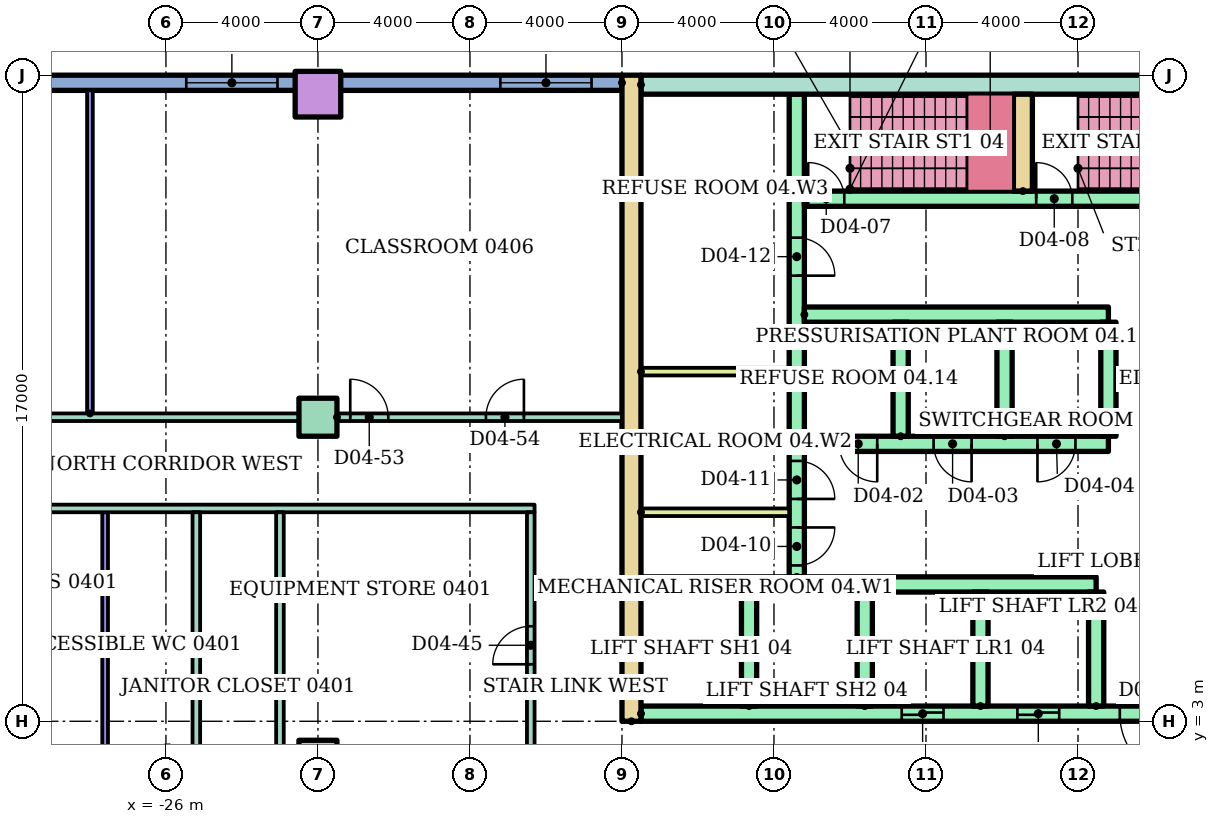
"""IFC4 building model, lengths in metres.
Left out: names, types, materials, properties, quantities, classifications, styles, units other than length and angle.
Written with IfcOpenShell. Run it as: python <this file> out.ifc"""

import sys

from ifc_helpers import new_model, si_unit, direction, frame, frame_2d, origin, origin_2d, place, context, subcontext, project, spatial, rectangle, hollow_rectangle, extrude, element, fill, save


model = new_model("IFC4")
c1 = context("Model", 3, precision=1e-05, world=origin(), true_north=direction((0.0, 1.0)))
c2 = subcontext(c1, "Body", "Model", "MODEL_VIEW")
j1 = project(units=[si_unit("LENGTHUNIT", "METRE"), si_unit("PLANEANGLEUNIT", "RADIAN")], contexts=[c1])
p1 = place(None, origin())
s1 = spatial("IfcSite", under=j1, at=p1, CompositionType="ELEMENT")
p2 = place(p1, origin())
s2 = spatial("IfcBuilding", under=s1, at=p2, CompositionType="ELEMENT")
p3 = place(p2, frame((0.0, 0.0, 18.0)))
s3 = spatial("IfcBuildingStorey", under=s2, at=p3, CompositionType="ELEMENT", Elevation=18.0)
for number, where in (
    (1, (-22.0, 2.0, 0.0)),
    (2, (-22.0, 11.0, 0.0)),
):
    element("IfcColumn", number, at=place(p3, frame(where)), inside=s3, PredefinedType="COLUMN", context=c2, shape_type="SweptSolid", body=[
        extrude(rectangle(XDim=1.0, YDim=1.0, at=origin_2d()), origin(), (0.0, 0.0, 1.0), 4.0),
    ])
p4 = place(p3, frame((-22.0, 19.5, 0.0)))
e3 = element("IfcColumn", 3, at=p4, inside=s3, PredefinedType="COLUMN", context=c2, shape_type="SweptSolid", body=[
    extrude(hollow_rectangle(XDim=1.2, YDim=1.2, WallThickness=0.06, at=origin_2d()), origin(), (0.0, 0.0, 1.0), 4.0),
])
p5 = place(p3, frame((-14.0, 19.8, 0.0), z_axis=(0.0, 0.0, 1.0), x_axis=(-1.0, 0.0, 0.0)))
e4 = element("IfcWall", 4, at=p5, inside=s3, PredefinedType="STANDARD", context=c2, shape_type="SweptSolid", body=[
    extrude(rectangle(XDim=25.6, YDim=0.4, at=frame_2d((12.8, 0.0))), origin(), (0.0, 0.0, 1.0), 3.7),
])
p6 = place(p5, frame((0.8, 0.0, 0.9)))
e5 = element("IfcOpeningElement", 5, at=p6, cuts=e4, PredefinedType="OPENING", context=c2, shape_type="SweptSolid", body=[
    extrude(rectangle(XDim=2.4, YDim=2.1, at=frame_2d((1.2, 1.05))), frame((0.0, 0.21, 0.0), z_axis=(0.0, -1.0, 0.0), x_axis=(1.0, 0.0, 0.0)), (0.0, 0.0, 1.0), 0.42),
])
p7 = place(p5, frame((9.065, 0.0, 0.9)))
e6 = element("IfcOpeningElement", 6, at=p7, cuts=e4, PredefinedType="OPENING", context=c2, shape_type="SweptSolid", body=[
    extrude(rectangle(XDim=2.4, YDim=2.1, at=frame_2d((1.2, 1.05))), frame((0.0, 0.21, 0.0), z_axis=(0.0, -1.0, 0.0), x_axis=(1.0, 0.0, 0.0)), (0.0, 0.0, 1.0), 0.42),
])
p8 = place(p5, frame((20.8, 0.0, 0.9)))
e7 = element("IfcOpeningElement", 7, at=p8, cuts=e4, PredefinedType="OPENING", context=c2, shape_type="SweptSolid", body=[
    extrude(rectangle(XDim=2.4, YDim=2.1, at=frame_2d((1.2, 1.05))), frame((0.0, 0.21, 0.0), z_axis=(0.0, -1.0, 0.0), x_axis=(1.0, 0.0, 0.0)), (0.0, 0.0, 1.0), 0.42),
])
p9 = place(p3, frame((-13.75, 3.0, 0.0), z_axis=(0.0, 0.0, 1.0), x_axis=(0.0, 1.0, 0.0)))
e8 = element("IfcWall", 8, at=p9, inside=s3, PredefinedType="SHEAR", context=c2, shape_type="SweptSolid", body=[
    extrude(rectangle(XDim=17.0, YDim=0.5, at=frame_2d((8.5, 0.0))), origin(), (0.0, 0.0, 1.0), 3.7),
])
p10 = place(p3, frame((-13.5, 19.75, 0.0)))
e9 = element("IfcWall", 9, at=p10, inside=s3, PredefinedType="SHEAR", context=c2, shape_type="SweptSolid", body=[
    extrude(rectangle(XDim=27.0, YDim=0.5, at=frame_2d((13.5, 0.0))), origin(), (0.0, 0.0, 1.0), 3.7),
])
p11 = place(p3, frame((-9.4, 6.8, 0.0), z_axis=(0.0, 0.0, 1.0), x_axis=(0.0, 1.0, 0.0)))
e10 = element("IfcWall", 10, at=p11, inside=s3, PredefinedType="SHEAR", context=c2, shape_type="SweptSolid", body=[
    extrude(rectangle(XDim=12.7, YDim=0.4, at=frame_2d((6.35, 0.0))), origin(), (0.0, 0.0, 1.0), 3.7),
])
p12 = place(p11, frame((0.3, 0.0, 0.0)))
e11 = element("IfcOpeningElement", 11, at=p12, cuts=e10, PredefinedType="OPENING", context=c2, shape_type="SweptSolid", body=[
    extrude(rectangle(XDim=1.0, YDim=2.1, at=frame_2d((0.5, 1.05))), frame((0.0, 0.21, 0.0), z_axis=(0.0, -1.0, 0.0), x_axis=(1.0, 0.0, 0.0)), (0.0, 0.0, 1.0), 0.42),
])
p13 = place(p11, frame((2.05, 0.0, 0.0)))
e12 = element("IfcOpeningElement", 12, at=p13, cuts=e10, PredefinedType="OPENING", context=c2, shape_type="SweptSolid", body=[
    extrude(rectangle(XDim=1.0, YDim=2.1, at=frame_2d((0.5, 1.05))), frame((0.0, 0.21, 0.0), z_axis=(0.0, -1.0, 0.0), x_axis=(1.0, 0.0, 0.0)), (0.0, 0.0, 1.0), 0.42),
])
p14 = place(p11, frame((7.925, 0.0, 0.0)))
e13 = element("IfcOpeningElement", 13, at=p14, cuts=e10, PredefinedType="OPENING", context=c2, shape_type="SweptSolid", body=[
    extrude(rectangle(XDim=1.0, YDim=2.1, at=frame_2d((0.5, 1.05))), frame((0.0, 0.21, 0.0), z_axis=(0.0, -1.0, 0.0), x_axis=(1.0, 0.0, 0.0)), (0.0, 0.0, 1.0), 0.42),
])
p15 = place(p3, frame((-13.5, 3.2, 0.0)))
e14 = element("IfcWall", 14, at=p15, inside=s3, PredefinedType="SHEAR", context=c2, shape_type="SweptSolid", body=[
    extrude(rectangle(XDim=27.0, YDim=0.4, at=frame_2d((13.5, 0.0))), origin(), (0.0, 0.0, 1.0), 3.7),
])
p16 = place(p15, frame((6.861, 0.0, 0.0)))
e15 = element("IfcOpeningElement", 15, at=p16, cuts=e14, PredefinedType="OPENING", context=c2, shape_type="SweptSolid", body=[
    extrude(rectangle(XDim=1.1, YDim=2.1, at=frame_2d((0.55, 1.05))), frame((0.0, 0.21, 0.0), z_axis=(0.0, -1.0, 0.0), x_axis=(1.0, 0.0, 0.0)), (0.0, 0.0, 1.0), 0.42),
])
p17 = place(p15, frame((9.906, 0.0, 0.0)))
e16 = element("IfcOpeningElement", 16, at=p17, cuts=e14, PredefinedType="OPENING", context=c2, shape_type="SweptSolid", body=[
    extrude(rectangle(XDim=1.1, YDim=2.1, at=frame_2d((0.55, 1.05))), frame((0.0, 0.21, 0.0), z_axis=(0.0, -1.0, 0.0), x_axis=(1.0, 0.0, 0.0)), (0.0, 0.0, 1.0), 0.42),
])
p18 = place(p15, frame((15.994, 0.0, 0.0)))
e17 = element("IfcOpeningElement", 17, at=p18, cuts=e14, PredefinedType="OPENING", context=c2, shape_type="SweptSolid", body=[
    extrude(rectangle(XDim=1.1, YDim=2.1, at=frame_2d((0.55, 1.05))), frame((0.0, 0.21, 0.0), z_axis=(0.0, -1.0, 0.0), x_axis=(1.0, 0.0, 0.0)), (0.0, 0.0, 1.0), 0.42),
])
p19 = place(p15, frame((19.039, 0.0, 0.0)))
e18 = element("IfcOpeningElement", 18, at=p19, cuts=e14, PredefinedType="OPENING", context=c2, shape_type="SweptSolid", body=[
    extrude(rectangle(XDim=1.1, YDim=2.1, at=frame_2d((0.55, 1.05))), frame((0.0, 0.21, 0.0), z_axis=(0.0, -1.0, 0.0), x_axis=(1.0, 0.0, 0.0)), (0.0, 0.0, 1.0), 0.42),
])
p20 = place(p15, frame((12.6, 0.0, 0.0)))
e19 = element("IfcOpeningElement", 19, at=p20, cuts=e14, PredefinedType="OPENING", context=c2, shape_type="SweptSolid", body=[
    extrude(rectangle(XDim=1.8, YDim=2.1, at=frame_2d((0.9, 1.05))), frame((0.0, 0.21, 0.0), z_axis=(0.0, -1.0, 0.0), x_axis=(1.0, 0.0, 0.0)), (0.0, 0.0, 1.0), 0.42),
])
p21 = place(p3, frame((-13.5, 6.6, 0.0)))
e20 = element("IfcWall", 20, at=p21, inside=s3, PredefinedType="SHEAR", context=c2, shape_type="SweptSolid", body=[
    extrude(rectangle(XDim=11.978, YDim=0.4, at=frame_2d((5.989, 0.0))), origin(), (0.0, 0.0, 1.0), 3.7),
])
for number, where, z_axis, x_axis in (
    (21, (-10.656, 3.4, 0.0), (0.0, 0.0, 1.0), (0.0, 1.0, 0.0)),
    (22, (-7.611, 3.4, 0.0), (0.0, 0.0, 1.0), (0.0, 1.0, 0.0)),
    (23, (-4.567, 3.4, 0.0), (0.0, 0.0, 1.0), (0.0, 1.0, 0.0)),
    (24, (-1.522, 3.4, 0.0), (0.0, 0.0, 1.0), (0.0, 1.0, 0.0)),
):
    element("IfcWall", number, at=place(p3, frame(where, z_axis=z_axis, x_axis=x_axis)), inside=s3, PredefinedType="SHEAR", context=c2, shape_type="SweptSolid", body=[
        extrude(rectangle(XDim=3.0, YDim=0.4, at=frame_2d((1.5, 0.0))), origin(), (0.0, 0.0, 1.0), 3.7),
    ])
p22 = place(p3, frame((-9.2, 10.3, 0.0)))
e25 = element("IfcWall", 25, at=p22, inside=s3, PredefinedType="SHEAR", context=c2, shape_type="SweptSolid", body=[
    extrude(rectangle(XDim=8.0, YDim=0.4, at=frame_2d((4.0, 0.0))), origin(), (0.0, 0.0, 1.0), 3.7),
])
p23 = place(p22, frame((0.917, 0.0, 0.0)))
e26 = element("IfcOpeningElement", 26, at=p23, cuts=e25, PredefinedType="OPENING", context=c2, shape_type="SweptSolid", body=[
    extrude(rectangle(XDim=1.0, YDim=2.1, at=frame_2d((0.5, 1.05))), frame((0.0, 0.21, 0.0), z_axis=(0.0, -1.0, 0.0), x_axis=(1.0, 0.0, 0.0)), (0.0, 0.0, 1.0), 0.42),
])
p24 = place(p22, frame((3.4, 0.0, 0.0)))
e27 = element("IfcOpeningElement", 27, at=p24, cuts=e25, PredefinedType="OPENING", context=c2, shape_type="SweptSolid", body=[
    extrude(rectangle(XDim=1.0, YDim=2.1, at=frame_2d((0.5, 1.05))), frame((0.0, 0.21, 0.0), z_axis=(0.0, -1.0, 0.0), x_axis=(1.0, 0.0, 0.0)), (0.0, 0.0, 1.0), 0.42),
])
p25 = place(p22, frame((6.133, 0.0, 0.0)))
e28 = element("IfcOpeningElement", 28, at=p25, cuts=e25, PredefinedType="OPENING", context=c2, shape_type="SweptSolid", body=[
    extrude(rectangle(XDim=1.0, YDim=2.1, at=frame_2d((0.5, 1.05))), frame((0.0, 0.21, 0.0), z_axis=(0.0, -1.0, 0.0), x_axis=(1.0, 0.0, 0.0)), (0.0, 0.0, 1.0), 0.42),
])
p26 = place(p3, frame((-9.2, 13.7, 0.0)))
e29 = element("IfcWall", 29, at=p26, inside=s3, PredefinedType="SHEAR", context=c2, shape_type="SweptSolid", body=[
    extrude(rectangle(XDim=8.0, YDim=0.4, at=frame_2d((4.0, 0.0))), origin(), (0.0, 0.0, 1.0), 3.7),
])
for number, where, z_axis, x_axis in (
    (30, (-6.667, 10.5, 0.0), (0.0, 0.0, 1.0), (0.0, 1.0, 0.0)),
    (31, (-3.933, 10.5, 0.0), (0.0, 0.0, 1.0), (0.0, 1.0, 0.0)),
    (32, (-1.2, 10.5, 0.0), (0.0, 0.0, 1.0), (0.0, 1.0, 0.0)),
):
    element("IfcWall", number, at=place(p3, frame(where, z_axis=z_axis, x_axis=x_axis)), inside=s3, PredefinedType="SHEAR", context=c2, shape_type="SweptSolid", body=[
        extrude(rectangle(XDim=3.0, YDim=0.4, at=frame_2d((1.5, 0.0))), origin(), (0.0, 0.0, 1.0), 3.7),
    ])
p27 = place(p3, frame((-9.2, 16.75, 0.0)))
e33 = element("IfcWall", 33, at=p27, inside=s3, PredefinedType="SHEAR", context=c2, shape_type="SweptSolid", body=[
    extrude(rectangle(XDim=18.4, YDim=0.4, at=frame_2d((9.2, 0.0))), origin(), (0.0, 0.0, 1.0), 3.7),
])
p28 = place(p27, frame((0.1, 0.0, 0.0)))
e34 = element("IfcOpeningElement", 34, at=p28, cuts=e33, PredefinedType="OPENING", context=c2, shape_type="SweptSolid", body=[
    extrude(rectangle(XDim=0.95, YDim=2.1, at=frame_2d((0.475, 1.05))), frame((0.0, 0.21, 0.0), z_axis=(0.0, -1.0, 0.0), x_axis=(1.0, 0.0, 0.0)), (0.0, 0.0, 1.0), 0.42),
])
p29 = place(p27, frame((6.1, 0.0, 0.0)))
e35 = element("IfcOpeningElement", 35, at=p29, cuts=e33, PredefinedType="OPENING", context=c2, shape_type="SweptSolid", body=[
    extrude(rectangle(XDim=0.95, YDim=2.1, at=frame_2d((0.475, 1.05))), frame((0.0, 0.21, 0.0), z_axis=(0.0, -1.0, 0.0), x_axis=(1.0, 0.0, 0.0)), (0.0, 0.0, 1.0), 0.42),
])
p30 = place(p27, frame((12.1, 0.0, 0.0)))
e36 = element("IfcOpeningElement", 36, at=p30, cuts=e33, PredefinedType="OPENING", context=c2, shape_type="SweptSolid", body=[
    extrude(rectangle(XDim=0.95, YDim=2.1, at=frame_2d((0.475, 1.05))), frame((0.0, 0.21, 0.0), z_axis=(0.0, -1.0, 0.0), x_axis=(1.0, 0.0, 0.0)), (0.0, 0.0, 1.0), 0.42),
])
p31 = place(p3, frame((-3.45, 16.95, 0.0), z_axis=(0.0, 0.0, 1.0), x_axis=(0.0, 1.0, 0.0)))
e37 = element("IfcWall", 37, at=p31, inside=s3, PredefinedType="SHEAR", context=c2, shape_type="SweptSolid", body=[
    extrude(rectangle(XDim=2.55, YDim=0.5, at=frame_2d((1.275, 0.0))), origin(), (0.0, 0.0, 1.0), 3.7),
])
for number, where in (
    (38, (-13.5, 8.5, 0.0)),
    (39, (-13.5, 12.2, 0.0)),
):
    element("IfcWall", number, at=place(p3, frame(where)), inside=s3, PredefinedType="PARTITIONING", context=c2, shape_type="SweptSolid", body=[
        extrude(rectangle(XDim=3.9, YDim=0.2, at=frame_2d((1.95, 0.0))), origin(), (0.0, 0.0, 1.0), 3.7),
    ])
p32 = place(p3, frame((-37.6, 8.6, 0.0)))
e40 = element("IfcWall", 40, at=p32, inside=s3, PredefinedType="PARTITIONING", context=c2, shape_type="SweptSolid", body=[
    extrude(rectangle(XDim=21.3, YDim=0.2, at=frame_2d((10.65, 0.0))), origin(), (0.0, 0.0, 1.0), 3.7),
])
p33 = place(p3, frame((-29.5, 11.0, 0.0)))
e41 = element("IfcWall", 41, at=p33, inside=s3, PredefinedType="PARTITIONING", context=c2, shape_type="SweptSolid", body=[
    extrude(rectangle(XDim=7.0, YDim=0.2, at=frame_2d((3.5, 0.0))), origin(), (0.0, 0.0, 1.0), 3.7),
])
p34 = place(p3, frame((-21.5, 11.0, 0.0)))
e42 = element("IfcWall", 42, at=p34, inside=s3, PredefinedType="PARTITIONING", context=c2, shape_type="SweptSolid", body=[
    extrude(rectangle(XDim=7.5, YDim=0.2, at=frame_2d((3.75, 0.0))), origin(), (0.0, 0.0, 1.0), 3.7),
])
p35 = place(p34, frame((0.35, 0.0, 0.0)))
e43 = element("IfcOpeningElement", 43, at=p35, cuts=e42, PredefinedType="OPENING", context=c2, shape_type="SweptSolid", body=[
    extrude(rectangle(XDim=1.0, YDim=2.1, at=frame_2d((0.5, 1.05))), frame((0.0, 0.11, 0.0), z_axis=(0.0, -1.0, 0.0), x_axis=(1.0, 0.0, 0.0)), (0.0, 0.0, 1.0), 0.22),
])
p36 = place(p34, frame((3.92, 0.0, 0.0)))
e44 = element("IfcOpeningElement", 44, at=p36, cuts=e42, PredefinedType="OPENING", context=c2, shape_type="SweptSolid", body=[
    extrude(rectangle(XDim=1.0, YDim=2.1, at=frame_2d((0.5, 1.05))), frame((0.0, 0.11, 0.0), z_axis=(0.0, -1.0, 0.0), x_axis=(1.0, 0.0, 0.0)), (0.0, 0.0, 1.0), 0.22),
])
p37 = place(p3, frame((-28.0, 11.1, 0.0), z_axis=(0.0, 0.0, 1.0), x_axis=(0.0, 1.0, 0.0)))
e45 = element("IfcWall", 45, at=p37, inside=s3, PredefinedType="PARTITIONING", context=c2, shape_type="SweptSolid", body=[
    extrude(rectangle(XDim=8.5, YDim=0.15, at=frame_2d((4.25, 0.0))), origin(), (0.0, 0.0, 1.0), 3.7),
])
p38 = place(p3, frame((-27.6, 1.5, 0.0), z_axis=(0.0, 0.0, 1.0), x_axis=(0.0, 1.0, 0.0)))
e46 = element("IfcWall", 46, at=p38, inside=s3, PredefinedType="PARTITIONING", context=c2, shape_type="SweptSolid", body=[
    extrude(rectangle(XDim=7.0, YDim=0.15, at=frame_2d((3.5, 0.0))), origin(), (0.0, 0.0, 1.0), 3.7),
])
for number, where, z_axis, x_axis in (
    (47, (-25.2, 1.5, 0.0), (0.0, 0.0, 1.0), (0.0, 1.0, 0.0)),
    (48, (-23.0, 1.5, 0.0), (0.0, 0.0, 1.0), (0.0, 1.0, 0.0)),
):
    element("IfcWall", number, at=place(p3, frame(where, z_axis=z_axis, x_axis=x_axis)), inside=s3, PredefinedType="PARTITIONING", context=c2, shape_type="SweptSolid", body=[
        extrude(rectangle(XDim=7.0, YDim=0.2, at=frame_2d((3.5, 0.0))), origin(), (0.0, 0.0, 1.0), 3.7),
    ])
p39 = place(p3, frame((-16.4, 1.5, 0.0), z_axis=(0.0, 0.0, 1.0), x_axis=(0.0, 1.0, 0.0)))
e49 = element("IfcWall", 49, at=p39, inside=s3, PredefinedType="PARTITIONING", context=c2, shape_type="SweptSolid", body=[
    extrude(rectangle(XDim=7.0, YDim=0.2, at=frame_2d((3.5, 0.0))), origin(), (0.0, 0.0, 1.0), 3.7),
])
p40 = place(p39, frame((3.0, 0.0, 0.0)))
e50 = element("IfcOpeningElement", 50, at=p40, cuts=e49, PredefinedType="OPENING", context=c2, shape_type="SweptSolid", body=[
    extrude(rectangle(XDim=1.0, YDim=2.1, at=frame_2d((0.5, 1.05))), frame((0.0, 0.11, 0.0), z_axis=(0.0, -1.0, 0.0), x_axis=(1.0, 0.0, 0.0)), (0.0, 0.0, 1.0), 0.22),
])
p41 = place(p6, origin())
e51 = element("IfcWindow", 51, at=p41, inside=s3, PartitioningType="SINGLE_PANEL", PredefinedType="WINDOW", context=c2, shape_type="SweptSolid", body=[
    extrude(rectangle(XDim=2.4, YDim=2.1, at=frame_2d((1.2, 1.05))), frame((0.0, 0.03, 0.0), z_axis=(0.0, -1.0, 0.0), x_axis=(1.0, 0.0, 0.0)), (0.0, 0.0, 1.0), 0.06),
])
fill(e5, e51)
p42 = place(p7, origin())
e52 = element("IfcWindow", 52, at=p42, inside=s3, PartitioningType="SINGLE_PANEL", PredefinedType="WINDOW", context=c2, shape_type="SweptSolid", body=[
    extrude(rectangle(XDim=2.4, YDim=2.1, at=frame_2d((1.2, 1.05))), frame((0.0, 0.03, 0.0), z_axis=(0.0, -1.0, 0.0), x_axis=(1.0, 0.0, 0.0)), (0.0, 0.0, 1.0), 0.06),
])
fill(e6, e52)
p43 = place(p16, origin())
e53 = element("IfcDoor", 53, at=p43, inside=s3, OperationType="SLIDING_TO_LEFT", PredefinedType="DOOR", context=c2, shape_type="SweptSolid", body=[
    extrude(rectangle(XDim=1.1, YDim=2.1, at=frame_2d((0.55, 1.05))), frame((0.0, 0.025, 0.0), z_axis=(0.0, -1.0, 0.0), x_axis=(1.0, 0.0, 0.0)), (0.0, 0.0, 1.0), 0.05),
])
fill(e15, e53)
p44 = place(p17, origin())
e54 = element("IfcDoor", 54, at=p44, inside=s3, OperationType="SLIDING_TO_LEFT", PredefinedType="DOOR", context=c2, shape_type="SweptSolid", body=[
    extrude(rectangle(XDim=1.1, YDim=2.1, at=frame_2d((0.55, 1.05))), frame((0.0, 0.025, 0.0), z_axis=(0.0, -1.0, 0.0), x_axis=(1.0, 0.0, 0.0)), (0.0, 0.0, 1.0), 0.05),
])
fill(e16, e54)
p45 = place(p20, frame((1.8, 0.0, 0.0), z_axis=(0.0, 0.0, 1.0), x_axis=(-1.0, 0.0, 0.0)))
e55 = element("IfcDoor", 55, at=p45, inside=s3, OperationType="DOUBLE_DOOR_SINGLE_SWING", PredefinedType="DOOR", context=c2, shape_type="SweptSolid", body=[
    extrude(rectangle(XDim=1.8, YDim=2.1, at=frame_2d((0.9, 1.05))), frame((0.0, 0.025, 0.0), z_axis=(0.0, -1.0, 0.0), x_axis=(1.0, 0.0, 0.0)), (0.0, 0.0, 1.0), 0.05),
])
fill(e19, e55)
p46 = place(p23, frame((1.0, 0.0, 0.0), z_axis=(0.0, 0.0, 1.0), x_axis=(-1.0, 0.0, 0.0)))
e56 = element("IfcDoor", 56, at=p46, inside=s3, OperationType="SINGLE_SWING_RIGHT", PredefinedType="DOOR", context=c2, shape_type="SweptSolid", body=[
    extrude(rectangle(XDim=1.0, YDim=2.1, at=frame_2d((0.5, 1.05))), frame((0.0, 0.025, 0.0), z_axis=(0.0, -1.0, 0.0), x_axis=(1.0, 0.0, 0.0)), (0.0, 0.0, 1.0), 0.05),
])
fill(e26, e56)
p47 = place(p24, frame((1.0, 0.0, 0.0), z_axis=(0.0, 0.0, 1.0), x_axis=(-1.0, 0.0, 0.0)))
e57 = element("IfcDoor", 57, at=p47, inside=s3, OperationType="SINGLE_SWING_RIGHT", PredefinedType="DOOR", context=c2, shape_type="SweptSolid", body=[
    extrude(rectangle(XDim=1.0, YDim=2.1, at=frame_2d((0.5, 1.05))), frame((0.0, 0.025, 0.0), z_axis=(0.0, -1.0, 0.0), x_axis=(1.0, 0.0, 0.0)), (0.0, 0.0, 1.0), 0.05),
])
fill(e27, e57)
p48 = place(p25, frame((1.0, 0.0, 0.0), z_axis=(0.0, 0.0, 1.0), x_axis=(-1.0, 0.0, 0.0)))
e58 = element("IfcDoor", 58, at=p48, inside=s3, OperationType="SINGLE_SWING_LEFT", PredefinedType="DOOR", context=c2, shape_type="SweptSolid", body=[
    extrude(rectangle(XDim=1.0, YDim=2.1, at=frame_2d((0.5, 1.05))), frame((0.0, 0.025, 0.0), z_axis=(0.0, -1.0, 0.0), x_axis=(1.0, 0.0, 0.0)), (0.0, 0.0, 1.0), 0.05),
])
fill(e28, e58)
p49 = place(p28, origin())
e59 = element("IfcDoor", 59, at=p49, inside=s3, OperationType="SINGLE_SWING_LEFT", PredefinedType="DOOR", context=c2, shape_type="SweptSolid", body=[
    extrude(rectangle(XDim=0.95, YDim=2.1, at=frame_2d((0.475, 1.05))), frame((0.0, 0.025, 0.0), z_axis=(0.0, -1.0, 0.0), x_axis=(1.0, 0.0, 0.0)), (0.0, 0.0, 1.0), 0.05),
])
fill(e34, e59)
p50 = place(p29, origin())
e60 = element("IfcDoor", 60, at=p50, inside=s3, OperationType="SINGLE_SWING_LEFT", PredefinedType="DOOR", context=c2, shape_type="SweptSolid", body=[
    extrude(rectangle(XDim=0.95, YDim=2.1, at=frame_2d((0.475, 1.05))), frame((0.0, 0.025, 0.0), z_axis=(0.0, -1.0, 0.0), x_axis=(1.0, 0.0, 0.0)), (0.0, 0.0, 1.0), 0.05),
])
fill(e35, e60)
p51 = place(p12, frame((1.0, 0.0, 0.0), z_axis=(0.0, 0.0, 1.0), x_axis=(-1.0, 0.0, 0.0)))
e61 = element("IfcDoor", 61, at=p51, inside=s3, OperationType="SINGLE_SWING_RIGHT", PredefinedType="DOOR", context=c2, shape_type="SweptSolid", body=[
    extrude(rectangle(XDim=1.0, YDim=2.1, at=frame_2d((0.5, 1.05))), frame((0.0, 0.025, 0.0), z_axis=(0.0, -1.0, 0.0), x_axis=(1.0, 0.0, 0.0)), (0.0, 0.0, 1.0), 0.05),
])
fill(e11, e61)
p52 = place(p13, frame((1.0, 0.0, 0.0), z_axis=(0.0, 0.0, 1.0), x_axis=(-1.0, 0.0, 0.0)))
e62 = element("IfcDoor", 62, at=p52, inside=s3, OperationType="SINGLE_SWING_LEFT", PredefinedType="DOOR", context=c2, shape_type="SweptSolid", body=[
    extrude(rectangle(XDim=1.0, YDim=2.1, at=frame_2d((0.5, 1.05))), frame((0.0, 0.025, 0.0), z_axis=(0.0, -1.0, 0.0), x_axis=(1.0, 0.0, 0.0)), (0.0, 0.0, 1.0), 0.05),
])
fill(e12, e62)
p53 = place(p14, frame((1.0, 0.0, 0.0), z_axis=(0.0, 0.0, 1.0), x_axis=(-1.0, 0.0, 0.0)))
e63 = element("IfcDoor", 63, at=p53, inside=s3, OperationType="SINGLE_SWING_LEFT", PredefinedType="DOOR", context=c2, shape_type="SweptSolid", body=[
    extrude(rectangle(XDim=1.0, YDim=2.1, at=frame_2d((0.5, 1.05))), frame((0.0, 0.025, 0.0), z_axis=(0.0, -1.0, 0.0), x_axis=(1.0, 0.0, 0.0)), (0.0, 0.0, 1.0), 0.05),
])
fill(e13, e63)
p54 = place(p40, origin())
e64 = element("IfcDoor", 64, at=p54, inside=s3, OperationType="SINGLE_SWING_LEFT", PredefinedType="DOOR", context=c2, shape_type="SweptSolid", body=[
    extrude(rectangle(XDim=1.0, YDim=2.1, at=frame_2d((0.5, 1.05))), frame((0.0, 0.025, 0.0), z_axis=(0.0, -1.0, 0.0), x_axis=(1.0, 0.0, 0.0)), (0.0, 0.0, 1.0), 0.05),
])
fill(e50, e64)
p55 = place(p35, origin())
e65 = element("IfcDoor", 65, at=p55, inside=s3, OperationType="SINGLE_SWING_LEFT", PredefinedType="DOOR", context=c2, shape_type="SweptSolid", body=[
    extrude(rectangle(XDim=1.0, YDim=2.1, at=frame_2d((0.5, 1.05))), frame((0.0, 0.025, 0.0), z_axis=(0.0, -1.0, 0.0), x_axis=(1.0, 0.0, 0.0)), (0.0, 0.0, 1.0), 0.05),
])
fill(e43, e65)
p56 = place(p36, origin())
e66 = element("IfcDoor", 66, at=p56, inside=s3, OperationType="SINGLE_SWING_RIGHT", PredefinedType="DOOR", context=c2, shape_type="SweptSolid", body=[
    extrude(rectangle(XDim=1.0, YDim=2.1, at=frame_2d((0.5, 1.05))), frame((0.0, 0.025, 0.0), z_axis=(0.0, -1.0, 0.0), x_axis=(1.0, 0.0, 0.0)), (0.0, 0.0, 1.0), 0.05),
])
fill(e44, e66)
save(model, sys.argv[1])
